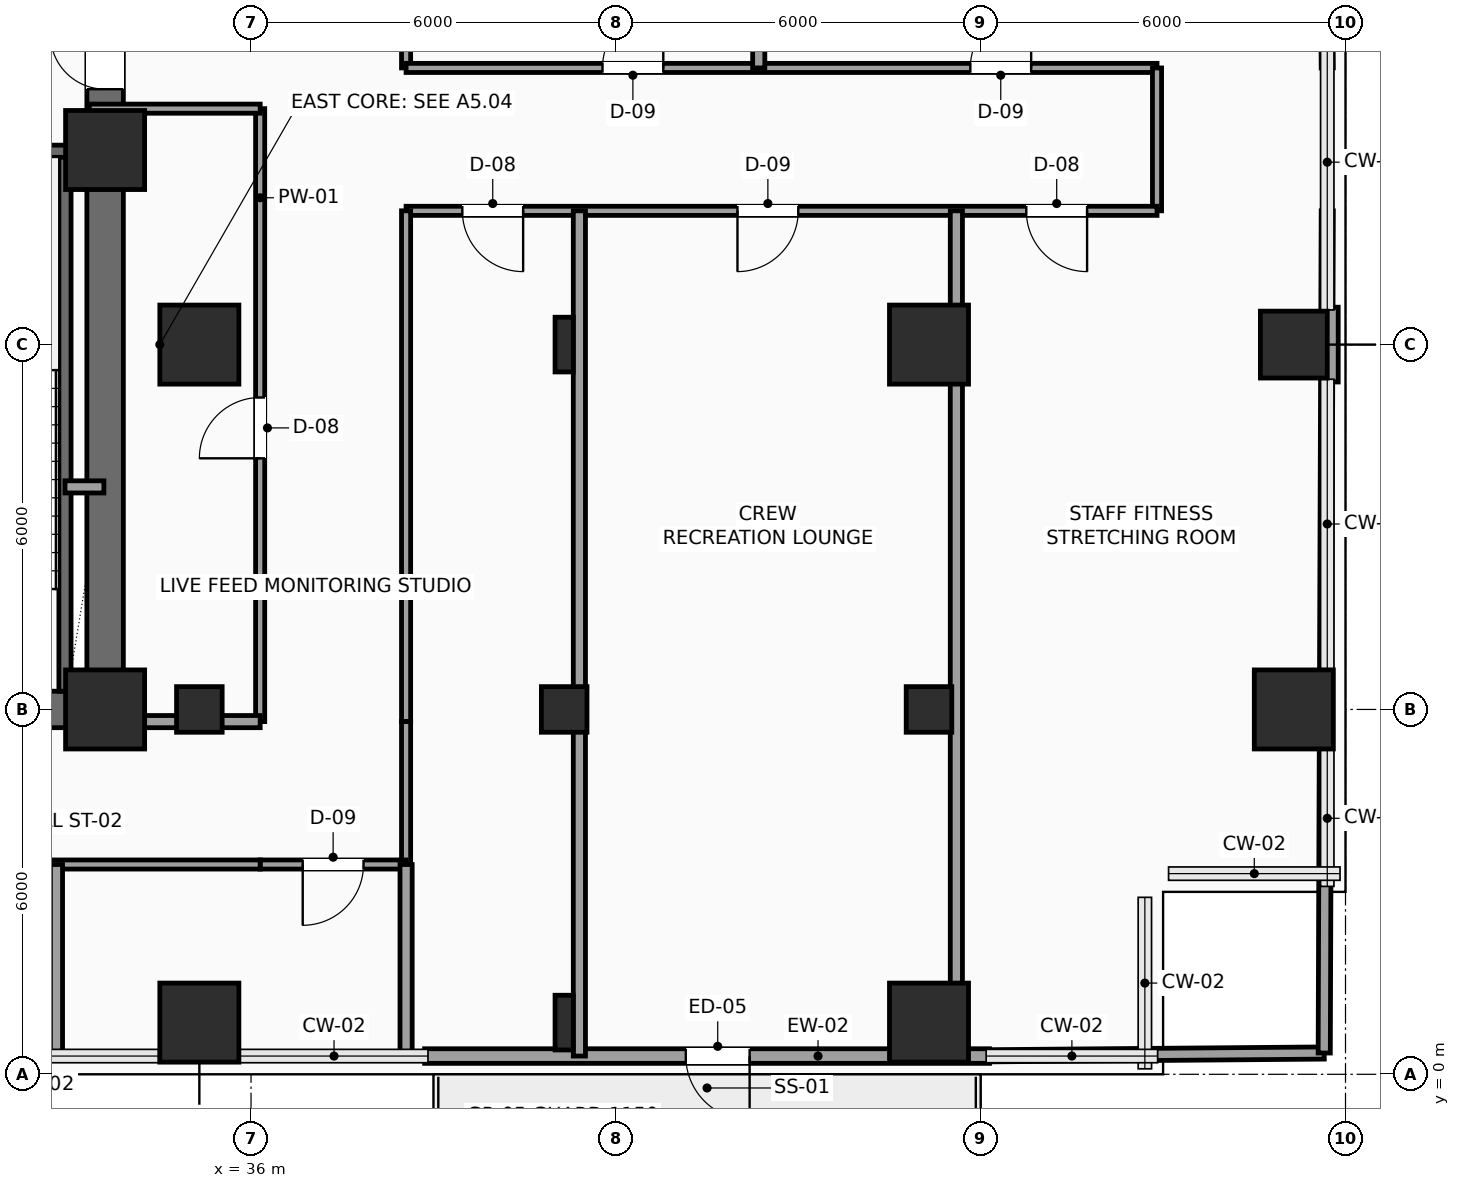
"""IFC4 building model, lengths in metres.
Left out: names, types, materials, properties, quantities, classifications, styles, units other than length and angle.
Written with IfcOpenShell. Run it as: python <this file> out.ifc"""

import sys

from ifc_helpers import new_model, si_unit, direction, frame, frame_2d, origin, origin_2d, place, context, subcontext, project, spatial, rectangle, hollow_rectangle, i_section, extrude, element, fill, save


model = new_model("IFC4")
c1 = context("Model", 3, precision=1e-05, world=origin(), true_north=direction((0.0, 1.0)))
c2 = subcontext(c1, "Body", "Model", "MODEL_VIEW")
j1 = project(units=[si_unit("LENGTHUNIT", "METRE"), si_unit("PLANEANGLEUNIT", "RADIAN")], contexts=[c1])
p1 = place(None, origin())
s1 = spatial("IfcSite", under=j1, at=p1, CompositionType="ELEMENT")
p2 = place(p1, origin())
s2 = spatial("IfcBuilding", under=s1, at=p2, CompositionType="ELEMENT")
p3 = place(p2, frame((0.0, 0.0, 75.3)))
s3 = spatial("IfcBuildingStorey", under=s2, at=p3, CompositionType="ELEMENT", Elevation=75.3)
for number, where, z_axis, x_axis in (
    (1, (33.6, 6.0, 0.0), (0.0, 0.0, 1.0), (1.0, 0.0, 0.0)),
    (2, (33.6, 15.2, 0.0), (0.0, 0.0, 1.0), (1.0, 0.0, 0.0)),
    (3, (35.15, 0.85, 0.0), (0.0, 0.0, 1.0), (1.0, 0.0, 0.0)),
):
    element("IfcColumn", number, at=place(p3, frame(where, z_axis=z_axis, x_axis=x_axis)), inside=s3, PredefinedType="COLUMN", context=c2, shape_type="SweptSolid", body=[
        extrude(rectangle(XDim=1.3, YDim=1.3, at=origin_2d()), origin(), (0.0, 0.0, 1.0), 3.9),
    ])
p4 = place(p3, frame((35.15, 6.0, 0.0), z_axis=(0.0, 0.0, 1.0), x_axis=(1.0, 0.0, 0.0)))
e4 = element("IfcColumn", 4, at=p4, inside=s3, PredefinedType="COLUMN", context=c2, shape_type="SweptSolid", body=[
    extrude(hollow_rectangle(XDim=0.75, YDim=0.75, WallThickness=0.035, InnerFilletRadius=0.035, OuterFilletRadius=0.05, at=origin_2d()), origin(), (0.0, 0.0, 1.0), 3.9),
])
p5 = place(p3, frame((35.15, 12.0, 0.0), z_axis=(0.0, 0.0, 1.0), x_axis=(1.0, 0.0, 0.0)))
e5 = element("IfcColumn", 5, at=p5, inside=s3, PredefinedType="COLUMN", context=c2, shape_type="SweptSolid", body=[
    extrude(rectangle(XDim=1.3, YDim=1.3, at=origin_2d()), origin(), (0.0, 0.0, 1.0), 3.9),
])
p6 = place(p3, frame((41.15, 0.85, 0.0), z_axis=(0.0, 0.0, 1.0), x_axis=(1.0, 0.0, 0.0)))
e6 = element("IfcColumn", 6, at=p6, inside=s3, PredefinedType="COLUMN", context=c2, shape_type="SweptSolid", body=[
    extrude(i_section(OverallWidth=0.3, OverallDepth=0.9, WebThickness=0.019, FlangeThickness=0.035, FilletRadius=0.03, at=origin_2d()), origin(), (0.0, 0.0, 1.0), 3.9),
])
p7 = place(p3, frame((41.15, 6.0, 0.0), z_axis=(0.0, 0.0, 1.0), x_axis=(1.0, 0.0, 0.0)))
e7 = element("IfcColumn", 7, at=p7, inside=s3, PredefinedType="COLUMN", context=c2, shape_type="SweptSolid", body=[
    extrude(hollow_rectangle(XDim=0.75, YDim=0.75, WallThickness=0.035, InnerFilletRadius=0.035, OuterFilletRadius=0.05, at=origin_2d()), origin(), (0.0, 0.0, 1.0), 3.9),
])
p8 = place(p3, frame((41.15, 12.0, 0.0), z_axis=(0.0, 0.0, 1.0), x_axis=(1.0, 0.0, 0.0)))
e8 = element("IfcColumn", 8, at=p8, inside=s3, PredefinedType="COLUMN", context=c2, shape_type="SweptSolid", body=[
    extrude(i_section(OverallWidth=0.3, OverallDepth=0.9, WebThickness=0.019, FlangeThickness=0.035, FilletRadius=0.03, at=origin_2d()), origin(), (0.0, 0.0, 1.0), 3.9),
])
p9 = place(p3, frame((47.15, 0.85, 0.0), z_axis=(0.0, 0.0, 1.0), x_axis=(1.0, 0.0, 0.0)))
e9 = element("IfcColumn", 9, at=p9, inside=s3, PredefinedType="COLUMN", context=c2, shape_type="SweptSolid", body=[
    extrude(rectangle(XDim=1.3, YDim=1.3, at=origin_2d()), origin(), (0.0, 0.0, 1.0), 3.9),
])
p10 = place(p3, frame((47.15, 6.0, 0.0), z_axis=(0.0, 0.0, 1.0), x_axis=(1.0, 0.0, 0.0)))
e10 = element("IfcColumn", 10, at=p10, inside=s3, PredefinedType="COLUMN", context=c2, shape_type="SweptSolid", body=[
    extrude(hollow_rectangle(XDim=0.75, YDim=0.75, WallThickness=0.035, InnerFilletRadius=0.035, OuterFilletRadius=0.05, at=origin_2d()), origin(), (0.0, 0.0, 1.0), 3.9),
])
for number, where, z_axis, x_axis in (
    (11, (47.15, 12.0, 0.0), (0.0, 0.0, 1.0), (1.0, 0.0, 0.0)),
    (12, (53.15, 6.0, 0.0), (0.0, 0.0, 1.0), (1.0, 0.0, 0.0)),
):
    element("IfcColumn", number, at=place(p3, frame(where, z_axis=z_axis, x_axis=x_axis)), inside=s3, PredefinedType="COLUMN", context=c2, shape_type="SweptSolid", body=[
        extrude(rectangle(XDim=1.3, YDim=1.3, at=origin_2d()), origin(), (0.0, 0.0, 1.0), 3.9),
    ])
p11 = place(p3, frame((53.15, 12.0, 0.0), z_axis=(0.0, 0.0, 1.0), x_axis=(1.0, 0.0, 0.0)))
e13 = element("IfcColumn", 13, at=p11, inside=s3, PredefinedType="COLUMN", context=c2, shape_type="SweptSolid", body=[
    extrude(rectangle(XDim=1.1, YDim=1.1, at=origin_2d()), origin(), (0.0, 0.0, 1.0), 3.9),
])
p12 = place(p3, frame((48.145, 0.3, 0.0), z_axis=(0.0, 0.0, 1.0), x_axis=(-1.0, 0.0, 0.0)))
e14 = element("IfcWall", 14, at=p12, inside=s3, PredefinedType="SOLIDWALL", context=c2, shape_type="SweptSolid", body=[
    extrude(rectangle(XDim=9.29, YDim=0.24, at=frame_2d((4.645, 0.0))), origin(), (0.0, 0.0, 1.0), 3.65),
])
p13 = place(p12, frame((3.945, 0.0, 0.0)))
e15 = element("IfcOpeningElement", 15, at=p13, cuts=e14, PredefinedType="OPENING", context=c2, shape_type="SweptSolid", body=[
    extrude(rectangle(XDim=1.05, YDim=2.2, at=frame_2d((0.525, 1.1))), frame((0.0, 0.13, 0.0), z_axis=(0.0, -1.0, 0.0), x_axis=(1.0, 0.0, 0.0)), (0.0, 0.0, 1.0), 0.26),
])
p14 = place(p3, frame((53.76, 12.615, 0.0), z_axis=(0.0, 0.0, 1.0), x_axis=(0.0, -1.0, 0.0)))
e16 = element("IfcWall", 16, at=p14, inside=s3, PredefinedType="SOLIDWALL", context=c2, shape_type="SweptSolid", body=[
    extrude(rectangle(XDim=1.23, YDim=0.24, at=frame_2d((0.615, 0.0))), origin(), (0.0, 0.0, 1.0), 3.65),
])
p15 = place(p3, frame((24.0, 6.0, 0.0), z_axis=(0.0, 0.0, 1.0), x_axis=(1.0, 0.0, 0.0)))
e17 = element("IfcWall", 17, at=p15, inside=s3, PredefinedType="SHEAR", context=c2, shape_type="SweptSolid", body=[
    extrude(rectangle(XDim=9.6, YDim=0.6, at=frame_2d((4.8, 0.0))), origin(), (0.0, 0.0, 1.0), 3.65),
])
p16 = place(p3, frame((33.6, 6.0, 0.0), z_axis=(0.0, 0.0, 1.0), x_axis=(0.0, 1.0, 0.0)))
e18 = element("IfcWall", 18, at=p16, inside=s3, PredefinedType="SHEAR", context=c2, shape_type="SweptSolid", body=[
    extrude(rectangle(XDim=12.0, YDim=0.6, at=frame_2d((6.0, 0.0))), origin(), (0.0, 0.0, 1.0), 3.65),
])
p17 = place(p16, frame((10.2, 0.0, 0.0)))
e19 = element("IfcOpeningElement", 19, at=p17, cuts=e18, PredefinedType="OPENING", context=c2, shape_type="SweptSolid", body=[
    extrude(rectangle(XDim=0.9, YDim=2.15, at=frame_2d((0.45, 1.075))), frame((0.0, 0.31, 0.0), z_axis=(0.0, -1.0, 0.0), x_axis=(1.0, 0.0, 0.0)), (0.0, 0.0, 1.0), 0.62),
])
p18 = place(p3, frame((32.94, 6.3, 0.0), z_axis=(0.0, 0.0, 1.0), x_axis=(0.0, 1.0, 0.0)))
e20 = element("IfcWall", 20, at=p18, inside=s3, PredefinedType="SHEAR", context=c2, shape_type="SweptSolid", body=[
    extrude(rectangle(XDim=8.88, YDim=0.2, at=frame_2d((4.44, 0.0))), origin(), (0.0, 0.0, 1.0), 3.65),
])
p19 = place(p3, frame((29.26, 15.18, 0.0), z_axis=(0.0, 0.0, 1.0), x_axis=(1.0, 0.0, 0.0)))
e21 = element("IfcWall", 21, at=p19, inside=s3, PredefinedType="SHEAR", context=c2, shape_type="SweptSolid", body=[
    extrude(rectangle(XDim=4.04, YDim=0.2, at=frame_2d((2.02, 0.0))), origin(), (0.0, 0.0, 1.0), 3.65),
])
p20 = place(p3, frame((32.94, 9.66, 0.0), z_axis=(0.0, 0.0, 1.0), x_axis=(1.0, 0.0, 0.0)))
e22 = element("IfcWall", 22, at=p20, inside=s3, PredefinedType="SOLIDWALL", context=c2, shape_type="SweptSolid", body=[
    extrude(rectangle(XDim=0.64, YDim=0.2, at=frame_2d((0.32, 0.0))), origin(), (0.0, 0.0, 1.0), 3.65),
])
p21 = place(p3, frame((36.15, 5.8, 0.0), z_axis=(0.0, 0.0, 1.0), x_axis=(0.0, 1.0, 0.0)))
e23 = element("IfcWall", 23, at=p21, inside=s3, PredefinedType="PARTITIONING", context=c2, shape_type="SweptSolid", body=[
    extrude(rectangle(XDim=10.08, YDim=0.15, at=frame_2d((5.04, 0.0))), origin(), (0.0, 0.0, 1.0), 3.65),
])
p22 = place(p21, frame((4.33, 0.0, 0.0)))
e24 = element("IfcOpeningElement", 24, at=p22, cuts=e23, PredefinedType="OPENING", context=c2, shape_type="SweptSolid", body=[
    extrude(rectangle(XDim=1.0, YDim=2.2, at=frame_2d((0.5, 1.1))), frame((0.0, 0.085, 0.0), z_axis=(0.0, -1.0, 0.0), x_axis=(1.0, 0.0, 0.0)), (0.0, 0.0, 1.0), 0.17),
])
p23 = place(p3, frame((36.15, 15.88, 0.0), z_axis=(0.0, 0.0, 1.0), x_axis=(-1.0, 0.0, 0.0)))
e25 = element("IfcWall", 25, at=p23, inside=s3, PredefinedType="PARTITIONING", context=c2, shape_type="SweptSolid", body=[
    extrude(rectangle(XDim=2.81, YDim=0.15, at=frame_2d((1.405, 0.0))), origin(), (0.0, 0.0, 1.0), 3.65),
])
p24 = place(p3, frame((38.55, 23.7, 0.0), z_axis=(0.0, 0.0, 1.0), x_axis=(0.0, -1.0, 0.0)))
e26 = element("IfcWall", 26, at=p24, inside=s3, PredefinedType="PARTITIONING", context=c2, shape_type="SweptSolid", body=[
    extrude(rectangle(XDim=7.15, YDim=0.15, at=frame_2d((3.575, 0.0))), origin(), (0.0, 0.0, 1.0), 3.65),
])
p25 = place(p3, frame((38.55, 16.55, 0.0), z_axis=(0.0, 0.0, 1.0), x_axis=(1.0, 0.0, 0.0)))
e27 = element("IfcWall", 27, at=p25, inside=s3, PredefinedType="PARTITIONING", context=c2, shape_type="SweptSolid", body=[
    extrude(rectangle(XDim=12.35, YDim=0.15, at=frame_2d((6.175, 0.0))), origin(), (0.0, 0.0, 1.0), 3.65),
])
p26 = place(p25, frame((3.23, 0.0, 0.0)))
e28 = element("IfcOpeningElement", 28, at=p26, cuts=e27, PredefinedType="OPENING", context=c2, shape_type="SweptSolid", body=[
    extrude(rectangle(XDim=1.0, YDim=2.2, at=frame_2d((0.5, 1.1))), frame((0.0, 0.085, 0.0), z_axis=(0.0, -1.0, 0.0), x_axis=(1.0, 0.0, 0.0)), (0.0, 0.0, 1.0), 0.17),
])
p27 = place(p25, frame((9.28, 0.0, 0.0)))
e29 = element("IfcOpeningElement", 29, at=p27, cuts=e27, PredefinedType="OPENING", context=c2, shape_type="SweptSolid", body=[
    extrude(rectangle(XDim=1.0, YDim=2.2, at=frame_2d((0.5, 1.1))), frame((0.0, 0.085, 0.0), z_axis=(0.0, -1.0, 0.0), x_axis=(1.0, 0.0, 0.0)), (0.0, 0.0, 1.0), 0.17),
])
p28 = place(p3, frame((50.9, 16.55, 0.0), z_axis=(0.0, 0.0, 1.0), x_axis=(0.0, -1.0, 0.0)))
e30 = element("IfcWall", 30, at=p28, inside=s3, PredefinedType="PARTITIONING", context=c2, shape_type="SweptSolid", body=[
    extrude(rectangle(XDim=2.35, YDim=0.15, at=frame_2d((1.175, 0.0))), origin(), (0.0, 0.0, 1.0), 3.65),
])
p29 = place(p3, frame((50.9, 14.2, 0.0), z_axis=(0.0, 0.0, 1.0), x_axis=(-1.0, 0.0, 0.0)))
e31 = element("IfcWall", 31, at=p29, inside=s3, PredefinedType="PARTITIONING", context=c2, shape_type="SweptSolid", body=[
    extrude(rectangle(XDim=12.35, YDim=0.15, at=frame_2d((6.175, 0.0))), origin(), (0.0, 0.0, 1.0), 3.65),
])
p30 = place(p29, frame((10.425, 0.0, 0.0)))
e32 = element("IfcOpeningElement", 32, at=p30, cuts=e31, PredefinedType="OPENING", context=c2, shape_type="SweptSolid", body=[
    extrude(rectangle(XDim=1.0, YDim=2.2, at=frame_2d((0.5, 1.1))), frame((0.0, 0.085, 0.0), z_axis=(0.0, -1.0, 0.0), x_axis=(1.0, 0.0, 0.0)), (0.0, 0.0, 1.0), 0.17),
])
p31 = place(p29, frame((5.9, 0.0, 0.0)))
e33 = element("IfcOpeningElement", 33, at=p31, cuts=e31, PredefinedType="OPENING", context=c2, shape_type="SweptSolid", body=[
    extrude(rectangle(XDim=1.0, YDim=2.2, at=frame_2d((0.5, 1.1))), frame((0.0, 0.085, 0.0), z_axis=(0.0, -1.0, 0.0), x_axis=(1.0, 0.0, 0.0)), (0.0, 0.0, 1.0), 0.17),
])
p32 = place(p29, frame((1.15, 0.0, 0.0)))
e34 = element("IfcOpeningElement", 34, at=p32, cuts=e31, PredefinedType="OPENING", context=c2, shape_type="SweptSolid", body=[
    extrude(rectangle(XDim=1.0, YDim=2.2, at=frame_2d((0.5, 1.1))), frame((0.0, 0.085, 0.0), z_axis=(0.0, -1.0, 0.0), x_axis=(1.0, 0.0, 0.0)), (0.0, 0.0, 1.0), 0.17),
])
p33 = place(p3, frame((38.55, 14.2, 0.0), z_axis=(0.0, 0.0, 1.0), x_axis=(0.0, -1.0, 0.0)))
e35 = element("IfcWall", 35, at=p33, inside=s3, PredefinedType="PARTITIONING", context=c2, shape_type="SweptSolid", body=[
    extrude(rectangle(XDim=8.4, YDim=0.15, at=frame_2d((4.2, 0.0))), origin(), (0.0, 0.0, 1.0), 3.65),
])
p34 = place(p3, frame((38.55, 5.8, 0.0), z_axis=(0.0, 0.0, 1.0), x_axis=(0.0, -1.0, 0.0)))
e36 = element("IfcWall", 36, at=p34, inside=s3, PredefinedType="PARTITIONING", context=c2, shape_type="SweptSolid", body=[
    extrude(rectangle(XDim=2.35, YDim=0.15, at=frame_2d((1.175, 0.0))), origin(), (0.0, 0.0, 1.0), 3.65),
])
p35 = place(p3, frame((38.55, 3.45, 0.0), z_axis=(0.0, 0.0, 1.0), x_axis=(-1.0, 0.0, 0.0)))
e37 = element("IfcWall", 37, at=p35, inside=s3, PredefinedType="PARTITIONING", context=c2, shape_type="SweptSolid", body=[
    extrude(rectangle(XDim=2.4, YDim=0.15, at=frame_2d((1.2, 0.0))), origin(), (0.0, 0.0, 1.0), 3.142),
])
p36 = place(p35, frame((0.7, 0.0, 0.0)))
e38 = element("IfcOpeningElement", 38, at=p36, cuts=e37, PredefinedType="OPENING", context=c2, shape_type="SweptSolid", body=[
    extrude(rectangle(XDim=1.0, YDim=2.2, at=frame_2d((0.5, 1.1))), frame((0.0, 0.085, 0.0), z_axis=(0.0, -1.0, 0.0), x_axis=(1.0, 0.0, 0.0)), (0.0, 0.0, 1.0), 0.17),
])
p37 = place(p3, frame((36.15, 3.45, 0.0), z_axis=(0.0, 0.0, 1.0), x_axis=(-1.0, 0.0, 0.0)))
e39 = element("IfcWall", 39, at=p37, inside=s3, PredefinedType="PARTITIONING", context=c2, shape_type="SweptSolid", body=[
    extrude(rectangle(XDim=14.6, YDim=0.15, at=frame_2d((7.3, 0.0))), origin(), (0.0, 0.0, 1.0), 3.142),
])
p38 = place(p37, frame((11.275, 0.0, 0.0)))
e40 = element("IfcOpeningElement", 40, at=p38, cuts=e39, PredefinedType="OPENING", context=c2, shape_type="SweptSolid", body=[
    extrude(rectangle(XDim=1.0, YDim=2.2, at=frame_2d((0.5, 1.1))), frame((0.0, 0.085, 0.0), z_axis=(0.0, -1.0, 0.0), x_axis=(1.0, 0.0, 0.0)), (0.0, 0.0, 1.0), 0.17),
])
p39 = place(p37, frame((5.65, 0.0, 0.0)))
e41 = element("IfcOpeningElement", 41, at=p39, cuts=e39, PredefinedType="OPENING", context=c2, shape_type="SweptSolid", body=[
    extrude(rectangle(XDim=1.0, YDim=2.2, at=frame_2d((0.5, 1.1))), frame((0.0, 0.085, 0.0), z_axis=(0.0, -1.0, 0.0), x_axis=(1.0, 0.0, 0.0)), (0.0, 0.0, 1.0), 0.17),
])
p40 = place(p3, frame((41.4, 0.3, 0.0), z_axis=(0.0, 0.0, 1.0), x_axis=(0.0, 1.0, 0.0)))
e42 = element("IfcWall", 42, at=p40, inside=s3, PredefinedType="PARTITIONING", context=c2, shape_type="SweptSolid", body=[
    extrude(rectangle(XDim=13.9, YDim=0.2, at=frame_2d((6.95, 0.0))), origin(), (0.0, 0.0, 1.0), 2.992),
])
p41 = place(p3, frame((47.6, 0.3, 0.0), z_axis=(0.0, 0.0, 1.0), x_axis=(0.0, 1.0, 0.0)))
e43 = element("IfcWall", 43, at=p41, inside=s3, PredefinedType="PARTITIONING", context=c2, shape_type="SweptSolid", body=[
    extrude(rectangle(XDim=13.9, YDim=0.2, at=frame_2d((6.95, 0.0))), origin(), (0.0, 0.0, 1.0), 3.65),
])
p42 = place(p3, frame((48.145, 0.304, 0.0), z_axis=(0.0, 0.0, 1.0), x_axis=(0.999965611379, 0.008293133286, 0.0)))
e44 = element("IfcWall", 44, at=p42, inside=s3, PredefinedType="PARTITIONING", context=c2, shape_type="SweptSolid", body=[
    extrude(rectangle(XDim=5.505, YDim=0.2, at=frame_2d((2.752, 0.0))), origin(), (0.0, 0.0, 1.0), 3.65),
])
p43 = place(p3, frame((53.65, 0.35, 0.0), z_axis=(0.0, 0.0, 1.0), x_axis=(0.003606251025, 0.999993497456, 0.0)))
e45 = element("IfcWall", 45, at=p43, inside=s3, PredefinedType="PARTITIONING", context=c2, shape_type="SweptSolid", body=[
    extrude(rectangle(XDim=11.035, YDim=0.2, at=frame_2d((5.518, 0.0))), origin(), (0.0, 0.0, 1.0), 3.65),
])
p44 = place(p3, frame((53.694, 12.615, 0.0), z_axis=(0.0, 0.0, 1.0), x_axis=(0.003542799701, 0.999993724265, 0.0)))
e46 = element("IfcWall", 46, at=p44, inside=s3, PredefinedType="PARTITIONING", context=c2, shape_type="SweptSolid", body=[
    extrude(rectangle(XDim=1.585, YDim=0.2, at=frame_2d((0.792, 0.0))), origin(), (0.0, 0.0, 1.0), 3.65),
])
p45 = place(p3, frame((44.35, 16.55, 0.0), z_axis=(0.0, 0.0, 1.0), x_axis=(0.0, 1.0, 0.0)))
e47 = element("IfcWall", 47, at=p45, inside=s3, PredefinedType="PARTITIONING", context=c2, shape_type="SweptSolid", body=[
    extrude(rectangle(XDim=7.15, YDim=0.2, at=frame_2d((3.575, 0.0))), origin(), (0.0, 0.0, 1.0), 3.65),
])
p46 = place(p3, frame((53.7, 16.55, 0.0), z_axis=(0.0, 0.0, 1.0), x_axis=(-0.007017371073, 0.999975377948, 0.0)))
e48 = element("IfcWall", 48, at=p46, inside=s3, PredefinedType="PARTITIONING", context=c2, shape_type="SweptSolid", body=[
    extrude(rectangle(XDim=0.835, YDim=0.2, at=frame_2d((0.417, 0.0))), origin(), (0.0, 0.0, 1.0), 3.65),
])
for number, where, z_axis, x_axis in (
    (49, (32.8, 0.3, 0.0), (0.0, 0.0, 1.0), (0.0, 1.0, 0.0)),
    (50, (38.55, 0.3, 0.0), (0.0, 0.0, 1.0), (0.0, 1.0, 0.0)),
):
    element("IfcWall", number, at=place(p3, frame(where, z_axis=z_axis, x_axis=x_axis)), inside=s3, PredefinedType="PARTITIONING", context=c2, shape_type="SweptSolid", body=[
        extrude(rectangle(XDim=3.15, YDim=0.2, at=frame_2d((1.575, 0.0))), origin(), (0.0, 0.0, 1.0), 3.65),
    ])
p47 = place(p3, frame((33.65, 5.8, 0.0), z_axis=(0.0, 0.0, 1.0), x_axis=(1.0, 0.0, 0.0)))
e51 = element("IfcWall", 51, at=p47, inside=s3, PredefinedType="PARTITIONING", context=c2, shape_type="SweptSolid", body=[
    extrude(rectangle(XDim=2.5, YDim=0.2, at=frame_2d((1.25, 0.0))), origin(), (0.0, 0.0, 1.0), 2.992),
])
p48 = place(p13, origin())
e52 = element("IfcDoor", 52, at=p48, inside=s3, OperationType="SINGLE_SWING_LEFT", PredefinedType="DOOR", context=c2, shape_type="SweptSolid", body=[
    extrude(rectangle(XDim=1.05, YDim=2.2, at=frame_2d((0.525, 1.1))), frame((0.0, 0.025, 0.0), z_axis=(0.0, -1.0, 0.0), x_axis=(1.0, 0.0, 0.0)), (0.0, 0.0, 1.0), 0.05),
])
fill(e15, e52)
p49 = place(p17, origin())
e53 = element("IfcDoor", 53, at=p49, inside=s3, OperationType="SINGLE_SWING_RIGHT", PredefinedType="DOOR", context=c2, shape_type="SweptSolid", body=[
    extrude(rectangle(XDim=0.9, YDim=2.15, at=frame_2d((0.45, 1.075))), frame((0.0, 0.025, 0.0), z_axis=(0.0, -1.0, 0.0), x_axis=(1.0, 0.0, 0.0)), (0.0, 0.0, 1.0), 0.05),
])
fill(e19, e53)
p50 = place(p22, origin())
e54 = element("IfcDoor", 54, at=p50, inside=s3, OperationType="SINGLE_SWING_LEFT", PredefinedType="DOOR", context=c2, shape_type="SweptSolid", body=[
    extrude(rectangle(XDim=1.0, YDim=2.2, at=frame_2d((0.5, 1.1))), frame((0.0, 0.025, 0.0), z_axis=(0.0, -1.0, 0.0), x_axis=(1.0, 0.0, 0.0)), (0.0, 0.0, 1.0), 0.05),
])
fill(e24, e54)
p51 = place(p26, origin())
e55 = element("IfcDoor", 55, at=p51, inside=s3, OperationType="SINGLE_SWING_RIGHT", PredefinedType="DOOR", context=c2, shape_type="SweptSolid", body=[
    extrude(rectangle(XDim=1.0, YDim=2.2, at=frame_2d((0.5, 1.1))), frame((0.0, 0.025, 0.0), z_axis=(0.0, -1.0, 0.0), x_axis=(1.0, 0.0, 0.0)), (0.0, 0.0, 1.0), 0.05),
])
fill(e28, e55)
p52 = place(p27, origin())
e56 = element("IfcDoor", 56, at=p52, inside=s3, OperationType="SINGLE_SWING_RIGHT", PredefinedType="DOOR", context=c2, shape_type="SweptSolid", body=[
    extrude(rectangle(XDim=1.0, YDim=2.2, at=frame_2d((0.5, 1.1))), frame((0.0, 0.025, 0.0), z_axis=(0.0, -1.0, 0.0), x_axis=(1.0, 0.0, 0.0)), (0.0, 0.0, 1.0), 0.05),
])
fill(e29, e56)
p53 = place(p30, origin())
e57 = element("IfcDoor", 57, at=p53, inside=s3, OperationType="SINGLE_SWING_LEFT", PredefinedType="DOOR", context=c2, shape_type="SweptSolid", body=[
    extrude(rectangle(XDim=1.0, YDim=2.2, at=frame_2d((0.5, 1.1))), frame((0.0, 0.025, 0.0), z_axis=(0.0, -1.0, 0.0), x_axis=(1.0, 0.0, 0.0)), (0.0, 0.0, 1.0), 0.05),
])
fill(e32, e57)
p54 = place(p31, origin())
e58 = element("IfcDoor", 58, at=p54, inside=s3, OperationType="SINGLE_SWING_RIGHT", PredefinedType="DOOR", context=c2, shape_type="SweptSolid", body=[
    extrude(rectangle(XDim=1.0, YDim=2.2, at=frame_2d((0.5, 1.1))), frame((0.0, 0.025, 0.0), z_axis=(0.0, -1.0, 0.0), x_axis=(1.0, 0.0, 0.0)), (0.0, 0.0, 1.0), 0.05),
])
fill(e33, e58)
p55 = place(p32, origin())
e59 = element("IfcDoor", 59, at=p55, inside=s3, OperationType="SINGLE_SWING_LEFT", PredefinedType="DOOR", context=c2, shape_type="SweptSolid", body=[
    extrude(rectangle(XDim=1.0, YDim=2.2, at=frame_2d((0.5, 1.1))), frame((0.0, 0.025, 0.0), z_axis=(0.0, -1.0, 0.0), x_axis=(1.0, 0.0, 0.0)), (0.0, 0.0, 1.0), 0.05),
])
fill(e34, e59)
p56 = place(p36, origin())
e60 = element("IfcDoor", 60, at=p56, inside=s3, OperationType="SINGLE_SWING_RIGHT", PredefinedType="DOOR", context=c2, shape_type="SweptSolid", body=[
    extrude(rectangle(XDim=1.0, YDim=2.2, at=frame_2d((0.5, 1.1))), frame((0.0, 0.025, 0.0), z_axis=(0.0, -1.0, 0.0), x_axis=(1.0, 0.0, 0.0)), (0.0, 0.0, 1.0), 0.05),
])
fill(e38, e60)
save(model, sys.argv[1])
